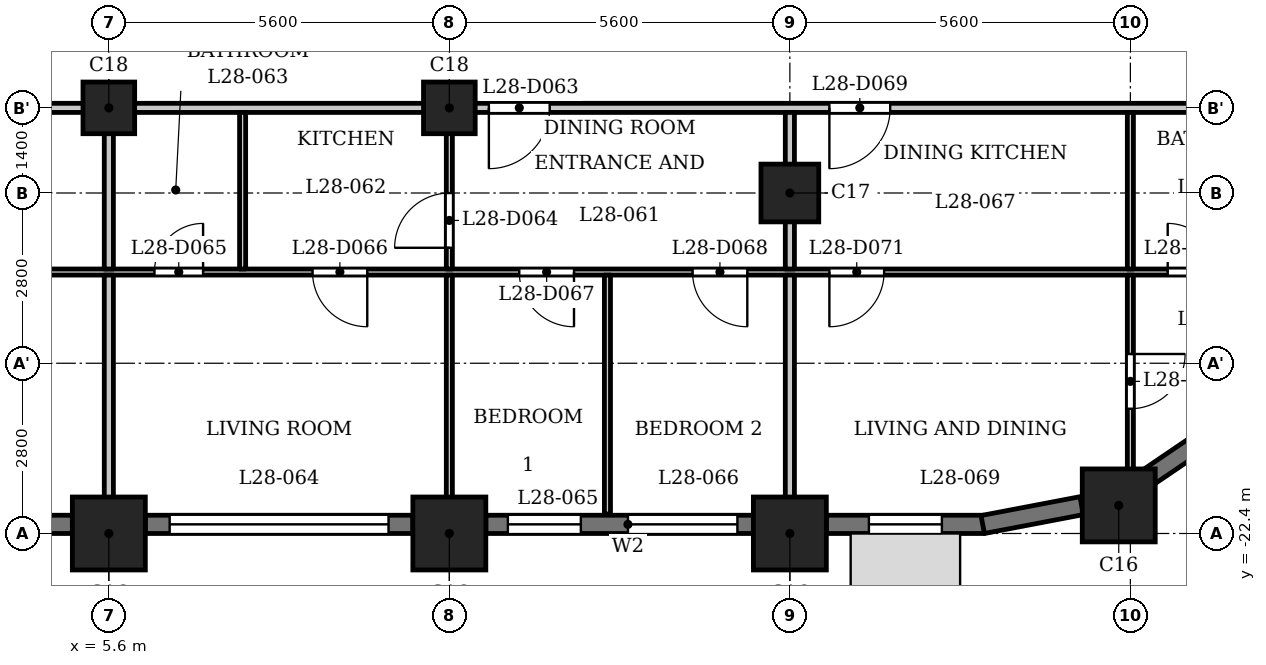
"""IFC4 building model, lengths in metres.
Left out: names, types, materials, properties, quantities, classifications, styles, units other than length and angle.
Written with IfcOpenShell. Run it as: python <this file> out.ifc"""

import sys

from ifc_helpers import new_model, si_unit, direction, frame, frame_2d, origin, origin_2d, place, context, subcontext, project, spatial, rectangle, extrude, element, fill, save


model = new_model("IFC4")
c1 = context("Model", 3, precision=1e-05, world=origin(), true_north=direction((0.0, 1.0)))
c2 = subcontext(c1, "Body", "Model", "MODEL_VIEW")
j1 = project(units=[si_unit("LENGTHUNIT", "METRE"), si_unit("PLANEANGLEUNIT", "RADIAN")], contexts=[c1])
p1 = place(None, origin())
s1 = spatial("IfcSite", under=j1, at=p1, CompositionType="ELEMENT")
p2 = place(p1, origin())
s2 = spatial("IfcBuilding", under=s1, at=p2, CompositionType="ELEMENT")
p3 = place(p2, frame((0.0, 0.0, 111.3)))
s3 = spatial("IfcBuildingStorey", under=s2, at=p3, CompositionType="ELEMENT", Elevation=111.3)
for number, where, z_axis, x_axis in (
    (1, (5.6, -22.4, 0.0), (0.0, 0.0, 1.0), (1.0, 0.0, 0.0)),
    (2, (11.2, -22.4, 0.0), (0.0, 0.0, 1.0), (1.0, 0.0, 0.0)),
    (3, (16.8, -22.4, 0.0), (0.0, 0.0, 1.0), (1.0, 0.0, 0.0)),
    (4, (22.209, -21.938, 0.0), (0.0, 0.0, 1.0), (1.0, 0.0, 0.0)),
):
    element("IfcColumn", number, at=place(p3, frame(where, z_axis=z_axis, x_axis=x_axis)), inside=s3, PredefinedType="COLUMN", context=c2, shape_type="SweptSolid", body=[
        extrude(rectangle(XDim=1.2, YDim=1.2, at=origin_2d()), origin(), (0.0, 0.0, 1.0), 3.5),
    ])
p4 = place(p3, frame((16.8, -16.8, 0.0), z_axis=(0.0, 0.0, 1.0), x_axis=(1.0, 0.0, 0.0)))
e5 = element("IfcColumn", 5, at=p4, inside=s3, PredefinedType="COLUMN", context=c2, shape_type="SweptSolid", body=[
    extrude(rectangle(XDim=0.95, YDim=0.95, at=origin_2d()), origin(), (0.0, 0.0, 1.0), 3.5),
])
for number, where, z_axis, x_axis in (
    (6, (5.6, -15.4, 0.0), (0.0, 0.0, 1.0), (1.0, 0.0, 0.0)),
    (7, (11.2, -15.4, 0.0), (0.0, 0.0, 1.0), (1.0, 0.0, 0.0)),
):
    element("IfcColumn", number, at=place(p3, frame(where, z_axis=z_axis, x_axis=x_axis)), inside=s3, PredefinedType="COLUMN", context=c2, shape_type="SweptSolid", body=[
        extrude(rectangle(XDim=0.85, YDim=0.85, at=origin_2d()), origin(), (0.0, 0.0, 1.0), 3.5),
    ])
p5 = place(p3, frame((0.6, -22.25, 0.0), z_axis=(0.0, 0.0, 1.0), x_axis=(1.0, 0.0, 0.0)))
e8 = element("IfcWall", 8, at=p5, inside=s3, PredefinedType="SOLIDWALL", context=c2, shape_type="SweptSolid", body=[
    extrude(rectangle(XDim=4.4, YDim=0.3, at=frame_2d((2.2, 0.0))), origin(), (0.0, 0.0, 1.0), 2.4),
])
p6 = place(p5, frame((0.4, 0.0, 1.2)))
e9 = element("IfcOpeningElement", 9, at=p6, cuts=e8, PredefinedType="OPENING", context=c2, shape_type="SweptSolid", body=[
    extrude(rectangle(XDim=3.6, YDim=0.95, at=frame_2d((1.8, 0.475))), frame((0.0, 0.16, 0.0), z_axis=(0.0, -1.0, 0.0), x_axis=(1.0, 0.0, 0.0)), (0.0, 0.0, 1.0), 0.32),
])
p7 = place(p3, frame((6.2, -22.25, 0.0), z_axis=(0.0, 0.0, 1.0), x_axis=(1.0, 0.0, 0.0)))
e10 = element("IfcWall", 10, at=p7, inside=s3, PredefinedType="SOLIDWALL", context=c2, shape_type="SweptSolid", body=[
    extrude(rectangle(XDim=4.4, YDim=0.3, at=frame_2d((2.2, 0.0))), origin(), (0.0, 0.0, 1.0), 2.4),
])
p8 = place(p7, frame((0.4, 0.0, 1.2)))
e11 = element("IfcOpeningElement", 11, at=p8, cuts=e10, PredefinedType="OPENING", context=c2, shape_type="SweptSolid", body=[
    extrude(rectangle(XDim=3.6, YDim=0.95, at=frame_2d((1.8, 0.475))), frame((0.0, 0.16, 0.0), z_axis=(0.0, -1.0, 0.0), x_axis=(1.0, 0.0, 0.0)), (0.0, 0.0, 1.0), 0.32),
])
p9 = place(p3, frame((11.8, -22.25, 0.0), z_axis=(0.0, 0.0, 1.0), x_axis=(1.0, 0.0, 0.0)))
e12 = element("IfcWall", 12, at=p9, inside=s3, PredefinedType="SOLIDWALL", context=c2, shape_type="SweptSolid", body=[
    extrude(rectangle(XDim=4.4, YDim=0.3, at=frame_2d((2.2, 0.0))), origin(), (0.0, 0.0, 1.0), 2.4),
])
p10 = place(p9, frame((0.363, 0.0, 0.6)))
e13 = element("IfcOpeningElement", 13, at=p10, cuts=e12, PredefinedType="OPENING", context=c2, shape_type="SweptSolid", body=[
    extrude(rectangle(XDim=1.2, YDim=1.55, at=frame_2d((0.6, 0.775))), frame((0.0, 0.16, 0.0), z_axis=(0.0, -1.0, 0.0), x_axis=(1.0, 0.0, 0.0)), (0.0, 0.0, 1.0), 0.32),
])
p11 = place(p9, frame((2.337, 0.0, 0.9)))
e14 = element("IfcOpeningElement", 14, at=p11, cuts=e12, PredefinedType="OPENING", context=c2, shape_type="SweptSolid", body=[
    extrude(rectangle(XDim=1.8, YDim=1.25, at=frame_2d((0.9, 0.625))), frame((0.0, 0.16, 0.0), z_axis=(0.0, -1.0, 0.0), x_axis=(1.0, 0.0, 0.0)), (0.0, 0.0, 1.0), 0.32),
])
p12 = place(p3, frame((17.4, -22.25, 0.0), z_axis=(0.0, 0.0, 1.0), x_axis=(1.0, 0.0, 0.0)))
e15 = element("IfcWall", 15, at=p12, inside=s3, PredefinedType="SOLIDWALL", context=c2, shape_type="SweptSolid", body=[
    extrude(rectangle(XDim=2.6, YDim=0.3, at=frame_2d((1.3, 0.0))), origin(), (0.0, 0.0, 1.0), 2.4),
])
p13 = place(p12, frame((0.7, 0.0, 0.6)))
e16 = element("IfcOpeningElement", 16, at=p13, cuts=e15, PredefinedType="OPENING", context=c2, shape_type="SweptSolid", body=[
    extrude(rectangle(XDim=1.2, YDim=1.55, at=frame_2d((0.6, 0.775))), frame((0.0, 0.16, 0.0), z_axis=(0.0, -1.0, 0.0), x_axis=(1.0, 0.0, 0.0)), (0.0, 0.0, 1.0), 0.32),
])
for number, where, z_axis, x_axis in (
    (17, (19.972, -22.253, 0.0), (0.0, 0.0, 1.0), (0.982, 0.187, 0.0)),
    (18, (22.643, -21.51, 0.0), (0.0, 0.0, 1.0), (0.827, 0.562, 0.0)),
):
    element("IfcWall", number, at=place(p3, frame(where, z_axis=z_axis, x_axis=x_axis)), inside=s3, PredefinedType="SOLIDWALL", context=c2, shape_type="SweptSolid", body=[
        extrude(rectangle(XDim=1.656, YDim=0.3, at=frame_2d((0.828, 0.0))), origin(), (0.0, 0.0, 1.0), 2.4),
    ])
p14 = place(p3, frame((-26.19, -18.1, 0.0), z_axis=(0.0, 0.0, 1.0), x_axis=(1.0, 0.0, 0.0)))
e19 = element("IfcWall", 19, at=p14, inside=s3, PredefinedType="PARTITIONING", context=c2, shape_type="SweptSolid", body=[
    extrude(rectangle(XDim=52.63, YDim=0.1, at=frame_2d((26.315, 0.0))), origin(), (0.0, 0.0, 1.0), 3.2),
])
p15 = place(p14, frame((1.09, 0.0, 0.0)))
e20 = element("IfcOpeningElement", 20, at=p15, cuts=e19, PredefinedType="OPENING", context=c2, shape_type="SweptSolid", body=[
    extrude(rectangle(XDim=0.8, YDim=2.1, at=frame_2d((0.4, 1.05))), frame((0.0, 0.06, 0.0), z_axis=(0.0, -1.0, 0.0), x_axis=(1.0, 0.0, 0.0)), (0.0, 0.0, 1.0), 0.12),
])
p16 = place(p14, frame((4.44, 0.0, 0.0)))
e21 = element("IfcOpeningElement", 21, at=p16, cuts=e19, PredefinedType="OPENING", context=c2, shape_type="SweptSolid", body=[
    extrude(rectangle(XDim=0.9, YDim=2.1, at=frame_2d((0.45, 1.05))), frame((0.0, 0.06, 0.0), z_axis=(0.0, -1.0, 0.0), x_axis=(1.0, 0.0, 0.0)), (0.0, 0.0, 1.0), 0.12),
])
p17 = place(p14, frame((10.14, 0.0, 0.0)))
e22 = element("IfcOpeningElement", 22, at=p17, cuts=e19, PredefinedType="OPENING", context=c2, shape_type="SweptSolid", body=[
    extrude(rectangle(XDim=0.8, YDim=2.1, at=frame_2d((0.4, 1.05))), frame((0.0, 0.06, 0.0), z_axis=(0.0, -1.0, 0.0), x_axis=(1.0, 0.0, 0.0)), (0.0, 0.0, 1.0), 0.12),
])
p18 = place(p14, frame((12.74, 0.0, 0.0)))
e23 = element("IfcOpeningElement", 23, at=p18, cuts=e19, PredefinedType="OPENING", context=c2, shape_type="SweptSolid", body=[
    extrude(rectangle(XDim=0.9, YDim=2.1, at=frame_2d((0.45, 1.05))), frame((0.0, 0.06, 0.0), z_axis=(0.0, -1.0, 0.0), x_axis=(1.0, 0.0, 0.0)), (0.0, 0.0, 1.0), 0.12),
])
p19 = place(p14, frame((16.14, 0.0, 0.0)))
e24 = element("IfcOpeningElement", 24, at=p19, cuts=e19, PredefinedType="OPENING", context=c2, shape_type="SweptSolid", body=[
    extrude(rectangle(XDim=0.9, YDim=2.1, at=frame_2d((0.45, 1.05))), frame((0.0, 0.06, 0.0), z_axis=(0.0, -1.0, 0.0), x_axis=(1.0, 0.0, 0.0)), (0.0, 0.0, 1.0), 0.12),
])
p20 = place(p14, frame((18.99, 0.0, 0.0)))
e25 = element("IfcOpeningElement", 25, at=p20, cuts=e19, PredefinedType="OPENING", context=c2, shape_type="SweptSolid", body=[
    extrude(rectangle(XDim=0.9, YDim=2.1, at=frame_2d((0.45, 1.05))), frame((0.0, 0.06, 0.0), z_axis=(0.0, -1.0, 0.0), x_axis=(1.0, 0.0, 0.0)), (0.0, 0.0, 1.0), 0.12),
])
p21 = place(p14, frame((26.84, 0.0, 0.0)))
e26 = element("IfcOpeningElement", 26, at=p21, cuts=e19, PredefinedType="OPENING", context=c2, shape_type="SweptSolid", body=[
    extrude(rectangle(XDim=0.8, YDim=2.1, at=frame_2d((0.4, 1.05))), frame((0.0, 0.06, 0.0), z_axis=(0.0, -1.0, 0.0), x_axis=(1.0, 0.0, 0.0)), (0.0, 0.0, 1.0), 0.12),
])
p22 = place(p14, frame((21.24, 0.0, 0.0)))
e27 = element("IfcOpeningElement", 27, at=p22, cuts=e19, PredefinedType="OPENING", context=c2, shape_type="SweptSolid", body=[
    extrude(rectangle(XDim=0.9, YDim=2.1, at=frame_2d((0.45, 1.05))), frame((0.0, 0.06, 0.0), z_axis=(0.0, -1.0, 0.0), x_axis=(1.0, 0.0, 0.0)), (0.0, 0.0, 1.0), 0.12),
])
p23 = place(p14, frame((32.54, 0.0, 0.0)))
e28 = element("IfcOpeningElement", 28, at=p23, cuts=e19, PredefinedType="OPENING", context=c2, shape_type="SweptSolid", body=[
    extrude(rectangle(XDim=0.8, YDim=2.1, at=frame_2d((0.4, 1.05))), frame((0.0, 0.06, 0.0), z_axis=(0.0, -1.0, 0.0), x_axis=(1.0, 0.0, 0.0)), (0.0, 0.0, 1.0), 0.12),
])
p24 = place(p14, frame((35.14, 0.0, 0.0)))
e29 = element("IfcOpeningElement", 29, at=p24, cuts=e19, PredefinedType="OPENING", context=c2, shape_type="SweptSolid", body=[
    extrude(rectangle(XDim=0.9, YDim=2.1, at=frame_2d((0.45, 1.05))), frame((0.0, 0.06, 0.0), z_axis=(0.0, -1.0, 0.0), x_axis=(1.0, 0.0, 0.0)), (0.0, 0.0, 1.0), 0.12),
])
p25 = place(p14, frame((38.54, 0.0, 0.0)))
e30 = element("IfcOpeningElement", 30, at=p25, cuts=e19, PredefinedType="OPENING", context=c2, shape_type="SweptSolid", body=[
    extrude(rectangle(XDim=0.9, YDim=2.1, at=frame_2d((0.45, 1.05))), frame((0.0, 0.06, 0.0), z_axis=(0.0, -1.0, 0.0), x_axis=(1.0, 0.0, 0.0)), (0.0, 0.0, 1.0), 0.12),
])
p26 = place(p14, frame((41.39, 0.0, 0.0)))
e31 = element("IfcOpeningElement", 31, at=p26, cuts=e19, PredefinedType="OPENING", context=c2, shape_type="SweptSolid", body=[
    extrude(rectangle(XDim=0.9, YDim=2.1, at=frame_2d((0.45, 1.05))), frame((0.0, 0.06, 0.0), z_axis=(0.0, -1.0, 0.0), x_axis=(1.0, 0.0, 0.0)), (0.0, 0.0, 1.0), 0.12),
])
p27 = place(p14, frame((49.204, 0.0, 0.0)))
e32 = element("IfcOpeningElement", 32, at=p27, cuts=e19, PredefinedType="OPENING", context=c2, shape_type="SweptSolid", body=[
    extrude(rectangle(XDim=0.8, YDim=2.1, at=frame_2d((0.4, 1.05))), frame((0.0, 0.06, 0.0), z_axis=(0.0, -1.0, 0.0), x_axis=(1.0, 0.0, 0.0)), (0.0, 0.0, 1.0), 0.12),
])
p28 = place(p14, frame((43.64, 0.0, 0.0)))
e33 = element("IfcOpeningElement", 33, at=p28, cuts=e19, PredefinedType="OPENING", context=c2, shape_type="SweptSolid", body=[
    extrude(rectangle(XDim=0.9, YDim=2.1, at=frame_2d((0.45, 1.05))), frame((0.0, 0.06, 0.0), z_axis=(0.0, -1.0, 0.0), x_axis=(1.0, 0.0, 0.0)), (0.0, 0.0, 1.0), 0.12),
])
p29 = place(p3, frame((-27.484, -15.4, 0.0), z_axis=(0.0, 0.0, 1.0), x_axis=(1.0, 0.0, 0.0)))
e34 = element("IfcWall", 34, at=p29, inside=s3, PredefinedType="PARTITIONING", context=c2, shape_type="SweptSolid", body=[
    extrude(rectangle(XDim=54.968, YDim=0.15, at=frame_2d((27.484, 0.0))), origin(), (0.0, 0.0, 1.0), 3.2),
])
p30 = place(p29, frame((5.734, 0.0, 0.0)))
e35 = element("IfcOpeningElement", 35, at=p30, cuts=e34, PredefinedType="OPENING", context=c2, shape_type="SweptSolid", body=[
    extrude(rectangle(XDim=1.0, YDim=2.1, at=frame_2d((0.5, 1.05))), frame((0.0, 0.085, 0.0), z_axis=(0.0, -1.0, 0.0), x_axis=(1.0, 0.0, 0.0)), (0.0, 0.0, 1.0), 0.17),
])
p31 = place(p29, frame((16.934, 0.0, 0.0)))
e36 = element("IfcOpeningElement", 36, at=p31, cuts=e34, PredefinedType="OPENING", context=c2, shape_type="SweptSolid", body=[
    extrude(rectangle(XDim=1.0, YDim=2.1, at=frame_2d((0.5, 1.05))), frame((0.0, 0.085, 0.0), z_axis=(0.0, -1.0, 0.0), x_axis=(1.0, 0.0, 0.0)), (0.0, 0.0, 1.0), 0.17),
])
p32 = place(p29, frame((22.534, 0.0, 0.0)))
e37 = element("IfcOpeningElement", 37, at=p32, cuts=e34, PredefinedType="OPENING", context=c2, shape_type="SweptSolid", body=[
    extrude(rectangle(XDim=1.0, YDim=2.1, at=frame_2d((0.5, 1.05))), frame((0.0, 0.085, 0.0), z_axis=(0.0, -1.0, 0.0), x_axis=(1.0, 0.0, 0.0)), (0.0, 0.0, 1.0), 0.17),
])
p33 = place(p29, frame((39.334, 0.0, 0.0)))
e38 = element("IfcOpeningElement", 38, at=p33, cuts=e34, PredefinedType="OPENING", context=c2, shape_type="SweptSolid", body=[
    extrude(rectangle(XDim=1.0, YDim=2.1, at=frame_2d((0.5, 1.05))), frame((0.0, 0.085, 0.0), z_axis=(0.0, -1.0, 0.0), x_axis=(1.0, 0.0, 0.0)), (0.0, 0.0, 1.0), 0.17),
])
p34 = place(p29, frame((44.934, 0.0, 0.0)))
e39 = element("IfcOpeningElement", 39, at=p34, cuts=e34, PredefinedType="OPENING", context=c2, shape_type="SweptSolid", body=[
    extrude(rectangle(XDim=1.0, YDim=2.1, at=frame_2d((0.5, 1.05))), frame((0.0, 0.085, 0.0), z_axis=(0.0, -1.0, 0.0), x_axis=(1.0, 0.0, 0.0)), (0.0, 0.0, 1.0), 0.17),
])
p35 = place(p3, frame((5.6, -22.98, 0.0), z_axis=(0.0, 0.0, 1.0), x_axis=(0.0, 1.0, 0.0)))
e40 = element("IfcWall", 40, at=p35, inside=s3, PredefinedType="PARTITIONING", context=c2, shape_type="SweptSolid", body=[
    extrude(rectangle(XDim=4.83, YDim=0.15, at=frame_2d((2.415, 0.0))), origin(), (0.0, 0.0, 1.0), 3.2),
])
p36 = place(p3, frame((5.6, -18.05, 0.0), z_axis=(0.0, 0.0, 1.0), x_axis=(0.0, 1.0, 0.0)))
e41 = element("IfcWall", 41, at=p36, inside=s3, PredefinedType="PARTITIONING", context=c2, shape_type="SweptSolid", body=[
    extrude(rectangle(XDim=2.575, YDim=0.15, at=frame_2d((1.288, 0.0))), origin(), (0.0, 0.0, 1.0), 3.2),
])
p37 = place(p3, frame((7.8, -18.05, 0.0), z_axis=(0.0, 0.0, 1.0), x_axis=(0.0, 1.0, 0.0)))
e42 = element("IfcWall", 42, at=p37, inside=s3, PredefinedType="PARTITIONING", context=c2, shape_type="SweptSolid", body=[
    extrude(rectangle(XDim=2.575, YDim=0.1, at=frame_2d((1.288, 0.0))), origin(), (0.0, 0.0, 1.0), 3.2),
])
p38 = place(p3, frame((11.2, -22.98, 0.0), z_axis=(0.0, 0.0, 1.0), x_axis=(0.0, 1.0, 0.0)))
e43 = element("IfcWall", 43, at=p38, inside=s3, PredefinedType="PARTITIONING", context=c2, shape_type="SweptSolid", body=[
    extrude(rectangle(XDim=4.83, YDim=0.1, at=frame_2d((2.415, 0.0))), origin(), (0.0, 0.0, 1.0), 3.2),
])
p39 = place(p3, frame((11.2, -18.05, 0.0), z_axis=(0.0, 0.0, 1.0), x_axis=(0.0, 1.0, 0.0)))
e44 = element("IfcWall", 44, at=p39, inside=s3, PredefinedType="PARTITIONING", context=c2, shape_type="SweptSolid", body=[
    extrude(rectangle(XDim=2.575, YDim=0.1, at=frame_2d((1.288, 0.0))), origin(), (0.0, 0.0, 1.0), 3.2),
])
p40 = place(p39, frame((0.349, 0.0, 0.0)))
e45 = element("IfcOpeningElement", 45, at=p40, cuts=e44, PredefinedType="OPENING", context=c2, shape_type="SweptSolid", body=[
    extrude(rectangle(XDim=0.9, YDim=2.1, at=frame_2d((0.45, 1.05))), frame((0.0, 0.06, 0.0), z_axis=(0.0, -1.0, 0.0), x_axis=(1.0, 0.0, 0.0)), (0.0, 0.0, 1.0), 0.12),
])
p41 = place(p3, frame((13.8, -22.08, 0.0), z_axis=(0.0, 0.0, 1.0), x_axis=(0.0, 1.0, 0.0)))
e46 = element("IfcWall", 46, at=p41, inside=s3, PredefinedType="PARTITIONING", context=c2, shape_type="SweptSolid", body=[
    extrude(rectangle(XDim=3.93, YDim=0.1, at=frame_2d((1.965, 0.0))), origin(), (0.0, 0.0, 1.0), 3.2),
])
p42 = place(p3, frame((16.8, -22.98, 0.0), z_axis=(0.0, 0.0, 1.0), x_axis=(0.0, 1.0, 0.0)))
e47 = element("IfcWall", 47, at=p42, inside=s3, PredefinedType="PARTITIONING", context=c2, shape_type="SweptSolid", body=[
    extrude(rectangle(XDim=4.83, YDim=0.15, at=frame_2d((2.415, 0.0))), origin(), (0.0, 0.0, 1.0), 3.2),
])
p43 = place(p3, frame((16.8, -18.05, 0.0), z_axis=(0.0, 0.0, 1.0), x_axis=(0.0, 1.0, 0.0)))
e48 = element("IfcWall", 48, at=p43, inside=s3, PredefinedType="PARTITIONING", context=c2, shape_type="SweptSolid", body=[
    extrude(rectangle(XDim=2.575, YDim=0.15, at=frame_2d((1.288, 0.0))), origin(), (0.0, 0.0, 1.0), 3.2),
])
p44 = place(p3, frame((22.4, -21.72, 0.0), z_axis=(0.0, 0.0, 1.0), x_axis=(0.0, 1.0, 0.0)))
e49 = element("IfcWall", 49, at=p44, inside=s3, PredefinedType="PARTITIONING", context=c2, shape_type="SweptSolid", body=[
    extrude(rectangle(XDim=3.57, YDim=0.1, at=frame_2d((1.785, 0.0))), origin(), (0.0, 0.0, 1.0), 3.2),
])
p45 = place(p44, frame((1.372, 0.0, 0.0)))
e50 = element("IfcOpeningElement", 50, at=p45, cuts=e49, PredefinedType="OPENING", context=c2, shape_type="SweptSolid", body=[
    extrude(rectangle(XDim=0.9, YDim=2.1, at=frame_2d((0.45, 1.05))), frame((0.0, 0.06, 0.0), z_axis=(0.0, -1.0, 0.0), x_axis=(1.0, 0.0, 0.0)), (0.0, 0.0, 1.0), 0.12),
])
p46 = place(p3, frame((22.4, -18.05, 0.0), z_axis=(0.0, 0.0, 1.0), x_axis=(0.0, 1.0, 0.0)))
e51 = element("IfcWall", 51, at=p46, inside=s3, PredefinedType="PARTITIONING", context=c2, shape_type="SweptSolid", body=[
    extrude(rectangle(XDim=2.575, YDim=0.1, at=frame_2d((1.288, 0.0))), origin(), (0.0, 0.0, 1.0), 3.2),
])
p47 = place(p33, origin())
e52 = element("IfcDoor", 52, at=p47, inside=s3, OperationType="SINGLE_SWING_LEFT", PredefinedType="DOOR", context=c2, shape_type="SweptSolid", body=[
    extrude(rectangle(XDim=1.0, YDim=2.1, at=frame_2d((0.5, 1.05))), frame((0.0, 0.025, 0.0), z_axis=(0.0, -1.0, 0.0), x_axis=(1.0, 0.0, 0.0)), (0.0, 0.0, 1.0), 0.05),
])
fill(e38, e52)
p48 = place(p40, origin())
e53 = element("IfcDoor", 53, at=p48, inside=s3, OperationType="SINGLE_SWING_RIGHT", PredefinedType="DOOR", context=c2, shape_type="SweptSolid", body=[
    extrude(rectangle(XDim=0.9, YDim=2.1, at=frame_2d((0.45, 1.05))), frame((0.0, 0.025, 0.0), z_axis=(0.0, -1.0, 0.0), x_axis=(1.0, 0.0, 0.0)), (0.0, 0.0, 1.0), 0.05),
])
fill(e45, e53)
p49 = place(p23, origin())
e54 = element("IfcDoor", 54, at=p49, inside=s3, OperationType="SINGLE_SWING_LEFT", PredefinedType="DOOR", context=c2, shape_type="SweptSolid", body=[
    extrude(rectangle(XDim=0.8, YDim=2.1, at=frame_2d((0.4, 1.05))), frame((0.0, 0.025, 0.0), z_axis=(0.0, -1.0, 0.0), x_axis=(1.0, 0.0, 0.0)), (0.0, 0.0, 1.0), 0.05),
])
fill(e28, e54)
p50 = place(p24, origin())
e55 = element("IfcDoor", 55, at=p50, inside=s3, OperationType="SINGLE_SWING_RIGHT", PredefinedType="DOOR", context=c2, shape_type="SweptSolid", body=[
    extrude(rectangle(XDim=0.9, YDim=2.1, at=frame_2d((0.45, 1.05))), frame((0.0, 0.025, 0.0), z_axis=(0.0, -1.0, 0.0), x_axis=(1.0, 0.0, 0.0)), (0.0, 0.0, 1.0), 0.05),
])
fill(e29, e55)
p51 = place(p25, origin())
e56 = element("IfcDoor", 56, at=p51, inside=s3, OperationType="SINGLE_SWING_RIGHT", PredefinedType="DOOR", context=c2, shape_type="SweptSolid", body=[
    extrude(rectangle(XDim=0.9, YDim=2.1, at=frame_2d((0.45, 1.05))), frame((0.0, 0.025, 0.0), z_axis=(0.0, -1.0, 0.0), x_axis=(1.0, 0.0, 0.0)), (0.0, 0.0, 1.0), 0.05),
])
fill(e30, e56)
p52 = place(p26, origin())
e57 = element("IfcDoor", 57, at=p52, inside=s3, OperationType="SINGLE_SWING_RIGHT", PredefinedType="DOOR", context=c2, shape_type="SweptSolid", body=[
    extrude(rectangle(XDim=0.9, YDim=2.1, at=frame_2d((0.45, 1.05))), frame((0.0, 0.025, 0.0), z_axis=(0.0, -1.0, 0.0), x_axis=(1.0, 0.0, 0.0)), (0.0, 0.0, 1.0), 0.05),
])
fill(e31, e57)
p53 = place(p34, origin())
e58 = element("IfcDoor", 58, at=p53, inside=s3, OperationType="SINGLE_SWING_LEFT", PredefinedType="DOOR", context=c2, shape_type="SweptSolid", body=[
    extrude(rectangle(XDim=1.0, YDim=2.1, at=frame_2d((0.5, 1.05))), frame((0.0, 0.025, 0.0), z_axis=(0.0, -1.0, 0.0), x_axis=(1.0, 0.0, 0.0)), (0.0, 0.0, 1.0), 0.05),
])
fill(e39, e58)
p54 = place(p27, origin())
e59 = element("IfcDoor", 59, at=p54, inside=s3, OperationType="SINGLE_SWING_RIGHT", PredefinedType="DOOR", context=c2, shape_type="SweptSolid", body=[
    extrude(rectangle(XDim=0.8, YDim=2.1, at=frame_2d((0.4, 1.05))), frame((0.0, 0.025, 0.0), z_axis=(0.0, -1.0, 0.0), x_axis=(1.0, 0.0, 0.0)), (0.0, 0.0, 1.0), 0.05),
])
fill(e32, e59)
p55 = place(p28, origin())
e60 = element("IfcDoor", 60, at=p55, inside=s3, OperationType="SINGLE_SWING_LEFT", PredefinedType="DOOR", context=c2, shape_type="SweptSolid", body=[
    extrude(rectangle(XDim=0.9, YDim=2.1, at=frame_2d((0.45, 1.05))), frame((0.0, 0.025, 0.0), z_axis=(0.0, -1.0, 0.0), x_axis=(1.0, 0.0, 0.0)), (0.0, 0.0, 1.0), 0.05),
])
fill(e33, e60)
p56 = place(p45, origin())
e61 = element("IfcDoor", 61, at=p56, inside=s3, OperationType="SINGLE_SWING_RIGHT", PredefinedType="DOOR", context=c2, shape_type="SweptSolid", body=[
    extrude(rectangle(XDim=0.9, YDim=2.1, at=frame_2d((0.45, 1.05))), frame((0.0, 0.025, 0.0), z_axis=(0.0, -1.0, 0.0), x_axis=(1.0, 0.0, 0.0)), (0.0, 0.0, 1.0), 0.05),
])
fill(e50, e61)
p57 = place(p8, origin())
e62 = element("IfcWindow", 62, at=p57, inside=s3, PartitioningType="SINGLE_PANEL", PredefinedType="WINDOW", context=c2, shape_type="SweptSolid", body=[
    extrude(rectangle(XDim=3.6, YDim=0.95, at=frame_2d((1.8, 0.475))), frame((0.0, 0.03, 0.0), z_axis=(0.0, -1.0, 0.0), x_axis=(1.0, 0.0, 0.0)), (0.0, 0.0, 1.0), 0.06),
])
fill(e11, e62)
p58 = place(p10, origin())
e63 = element("IfcWindow", 63, at=p58, inside=s3, PartitioningType="SINGLE_PANEL", PredefinedType="WINDOW", context=c2, shape_type="SweptSolid", body=[
    extrude(rectangle(XDim=1.2, YDim=1.55, at=frame_2d((0.6, 0.775))), frame((0.0, 0.03, 0.0), z_axis=(0.0, -1.0, 0.0), x_axis=(1.0, 0.0, 0.0)), (0.0, 0.0, 1.0), 0.06),
])
fill(e13, e63)
p59 = place(p11, origin())
e64 = element("IfcWindow", 64, at=p59, inside=s3, PartitioningType="SINGLE_PANEL", PredefinedType="WINDOW", context=c2, shape_type="SweptSolid", body=[
    extrude(rectangle(XDim=1.8, YDim=1.25, at=frame_2d((0.9, 0.625))), frame((0.0, 0.03, 0.0), z_axis=(0.0, -1.0, 0.0), x_axis=(1.0, 0.0, 0.0)), (0.0, 0.0, 1.0), 0.06),
])
fill(e14, e64)
p60 = place(p13, origin())
e65 = element("IfcWindow", 65, at=p60, inside=s3, PartitioningType="SINGLE_PANEL", PredefinedType="WINDOW", context=c2, shape_type="SweptSolid", body=[
    extrude(rectangle(XDim=1.2, YDim=1.55, at=frame_2d((0.6, 0.775))), frame((0.0, 0.03, 0.0), z_axis=(0.0, -1.0, 0.0), x_axis=(1.0, 0.0, 0.0)), (0.0, 0.0, 1.0), 0.06),
])
fill(e16, e65)
save(model, sys.argv[1])
